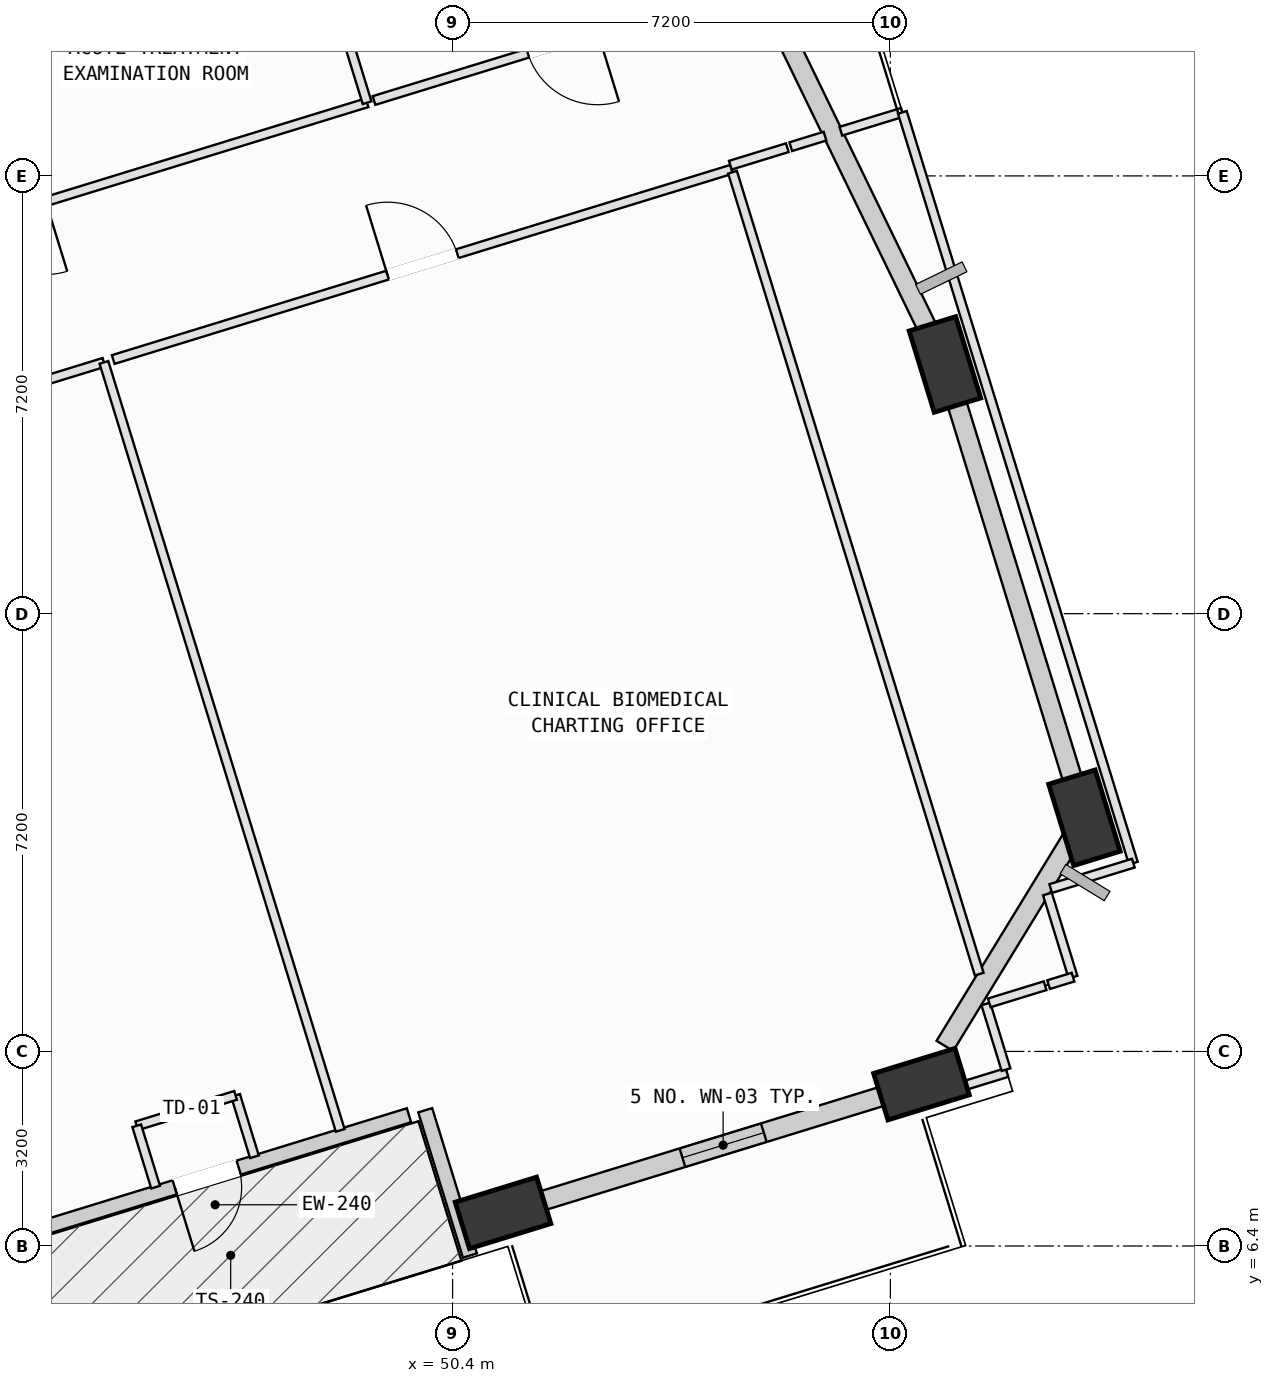
"""IFC4 building model, lengths in metres.
Left out: names, types, materials, properties, quantities, classifications, styles, units other than length and angle.
Written with IfcOpenShell. Run it as: python <this file> out.ifc"""

import sys

from ifc_helpers import new_model, si_unit, direction, frame, frame_2d, origin, origin_2d, place, context, subcontext, project, spatial, rectangle, extrude, element, fill, save


model = new_model("IFC4")
c1 = context("Model", 3, precision=1e-05, world=origin(), true_north=direction((0.0, 1.0)))
c2 = subcontext(c1, "Body", "Model", "MODEL_VIEW")
j1 = project(units=[si_unit("LENGTHUNIT", "METRE"), si_unit("PLANEANGLEUNIT", "RADIAN")], contexts=[c1])
p1 = place(None, origin())
s1 = spatial("IfcSite", under=j1, at=p1, CompositionType="ELEMENT")
p2 = place(p1, origin())
s2 = spatial("IfcBuilding", under=s1, at=p2, CompositionType="ELEMENT")
p3 = place(p2, frame((0.0, 0.0, 96.4)))
s3 = spatial("IfcBuildingStorey", under=s2, at=p3, CompositionType="ELEMENT", Elevation=96.4)
p4 = place(p3, frame((44.348, 4.827, 0.002), z_axis=(0.082049974213, 0.045069704145, 0.995608619639), x_axis=(-0.716749237193, 0.696787516623, 0.027526126896)))
e1 = element("IfcColumn", 1, at=p4, inside=s3, PredefinedType="COLUMN", context=c2, shape_type="SweptSolid", body=[
    extrude(rectangle(XDim=1.4, YDim=0.8, at=origin_2d()), origin(), (0.0, 0.0, 1.0), 4.014),
])
p5 = place(p3, frame((51.23, 6.945, 0.002), z_axis=(0.07303740566, 0.07328045859, 0.994633355445), x_axis=(-0.883427735312, 0.467578794967, 0.030422146198)))
e2 = element("IfcColumn", 2, at=p5, inside=s3, PredefinedType="COLUMN", context=c2, shape_type="SweptSolid", body=[
    extrude(rectangle(XDim=1.4, YDim=0.8, at=origin_2d()), origin(), (0.0, 0.0, 1.0), 4.018),
])
p6 = place(p3, frame((58.111, 9.062, 0.002), z_axis=(0.063925688501, 0.101407733561, 0.992788989627), x_axis=(-0.964220765458, 0.262746812496, 0.035248091899)))
e3 = element("IfcColumn", 3, at=p6, inside=s3, PredefinedType="COLUMN", context=c2, shape_type="SweptSolid", body=[
    extrude(rectangle(XDim=1.4, YDim=0.8, at=origin_2d()), origin(), (0.0, 0.0, 1.0), 4.025),
])
p7 = place(p3, frame((60.792, 13.444, 0.002), z_axis=(0.045783616594, 0.112245661345, 0.992625192085), x_axis=(-0.086057230979, -0.989529923829, 0.115864933618)))
e4 = element("IfcColumn", 4, at=p7, inside=s3, PredefinedType="COLUMN", context=c2, shape_type="SweptSolid", body=[
    extrude(rectangle(XDim=1.4, YDim=0.8, at=origin_2d()), origin(), (0.0, 0.0, 1.0), 4.026),
])
p8 = place(p3, frame((58.498, 20.899, 0.002), z_axis=(0.015250821808, 0.102806336649, 0.994584470811), x_axis=(0.151364494888, -0.983473931417, 0.099336880918)))
e5 = element("IfcColumn", 5, at=p8, inside=s3, PredefinedType="COLUMN", context=c2, shape_type="SweptSolid", body=[
    extrude(rectangle(XDim=1.4, YDim=0.8, at=origin_2d()), origin(), (0.0, 0.0, 1.0), 4.018),
])
p9 = place(p3, frame((49.683, 8.551, 0.0), z_axis=(0.0, 0.0, 1.0), x_axis=(-0.955788867777, -0.294053804998, 0.0)))
e6 = element("IfcWall", 6, at=p9, inside=s3, PredefinedType="SOLIDWALL", context=c2, shape_type="SweptSolid", body=[
    extrude(rectangle(XDim=6.96, YDim=0.24, at=frame_2d((3.48, 0.0))), origin(), (0.0, 0.0, 1.0), 3.165),
])
p10 = place(p9, frame((2.93, 0.0, 0.0)))
e7 = element("IfcOpeningElement", 7, at=p10, cuts=e6, PredefinedType="OPENING", context=c2, shape_type="SweptSolid", body=[
    extrude(rectangle(XDim=1.1, YDim=2.15, at=frame_2d((0.55, 1.075))), frame((0.0, 0.13, 0.0), z_axis=(0.0, -1.0, 0.0), x_axis=(1.0, 0.0, 0.0)), (0.0, 0.0, 1.0), 0.26),
])
p11 = place(p3, frame((50.686, 6.243, 0.0), z_axis=(0.0, 0.0, 1.0), x_axis=(-0.29411329549, 0.955770563167, 0.0)))
e8 = element("IfcWall", 8, at=p11, inside=s3, PredefinedType="SOLIDWALL", context=c2, shape_type="SweptSolid", body=[
    extrude(rectangle(XDim=2.5, YDim=0.24, at=frame_2d((1.25, 0.0))), origin(), (0.0, 0.0, 1.0), 3.165),
])
p12 = place(p3, frame((57.837, 8.977, 0.0), z_axis=(0.0, 0.0, 1.0), x_axis=(-0.955797610258, -0.294025387042, 0.0)))
e9 = element("IfcWall", 9, at=p12, inside=s3, PredefinedType="SOLIDWALL", context=c2, shape_type="SweptSolid", body=[
    extrude(rectangle(XDim=6.242, YDim=0.32, at=frame_2d((3.121, 0.0))), origin(), (0.0, 0.0, 1.0), 3.165),
])
p13 = place(p12, frame((2.425, 0.0, 0.75)))
e10 = element("IfcOpeningElement", 10, at=p13, cuts=e9, PredefinedType="OPENING", context=c2, shape_type="SweptSolid", body=[
    extrude(rectangle(XDim=1.4, YDim=1.85, at=frame_2d((0.7, 0.925))), frame((0.0, 0.17, 0.0), z_axis=(0.0, -1.0, 0.0), x_axis=(1.0, 0.0, 0.0)), (0.0, 0.0, 1.0), 0.34),
])
p14 = place(p3, frame((60.659, 13.227, 0.0), z_axis=(0.0, 0.0, 1.0), x_axis=(-0.521821602539, -0.85305463783, 0.0)))
e11 = element("IfcWall", 11, at=p14, inside=s3, PredefinedType="SOLIDWALL", context=c2, shape_type="SweptSolid", body=[
    extrude(rectangle(XDim=4.145, YDim=0.32, at=frame_2d((2.073, 0.0))), origin(), (0.0, 0.0, 1.0), 3.165),
])
p15 = place(p3, frame((58.586, 20.612, 0.0), z_axis=(0.0, 0.0, 1.0), x_axis=(0.294040701416, -0.955792899069, 0.0)))
e12 = element("IfcWall", 12, at=p15, inside=s3, PredefinedType="SOLIDWALL", context=c2, shape_type="SweptSolid", body=[
    extrude(rectangle(XDim=6.84, YDim=0.32, at=frame_2d((3.42, 0.0))), origin(), (0.0, 0.0, 1.0), 3.165),
])
p16 = place(p3, frame((54.353, 29.438, 0.0), z_axis=(0.0, 0.0, 1.0), x_axis=(0.436640831381, -0.899635917675, 0.0)))
e13 = element("IfcWall", 13, at=p16, inside=s3, PredefinedType="SOLIDWALL", context=c2, shape_type="SweptSolid", body=[
    extrude(rectangle(XDim=8.838, YDim=0.32, at=frame_2d((4.419, 0.0))), origin(), (0.0, 0.0, 1.0), 3.165),
])
p17 = place(p3, frame((41.742, 25.892, 0.0), z_axis=(0.0, 0.0, 1.0), x_axis=(0.955782399792, 0.294074827635, 0.0)))
e14 = element("IfcWall", 14, at=p17, inside=s3, PredefinedType="SOLIDWALL", context=c2, shape_type="SweptSolid", body=[
    extrude(rectangle(XDim=6.227, YDim=0.32, at=frame_2d((3.113, 0.0))), origin(), (0.0, 0.0, 1.0), 3.145),
])
p18 = place(p17, frame((2.41, 0.0, 0.75)))
e15 = element("IfcOpeningElement", 15, at=p18, cuts=e14, PredefinedType="OPENING", context=c2, shape_type="SweptSolid", body=[
    extrude(rectangle(XDim=1.4, YDim=1.85, at=frame_2d((0.7, 0.925))), frame((0.0, 0.17, 0.0), z_axis=(0.0, -1.0, 0.0), x_axis=(1.0, 0.0, 0.0)), (0.0, 0.0, 1.0), 0.34),
])
p19 = place(p3, frame((38.03, 18.891, 0.0), z_axis=(0.0, 0.0, 1.0), x_axis=(0.955772926222, 0.294105616236, 0.0)))
e16 = element("IfcWall", 16, at=p19, inside=s3, PredefinedType="PARTITIONING", context=c2, shape_type="SweptSolid", body=[
    extrude(rectangle(XDim=6.943, YDim=0.15, at=frame_2d((3.472, 0.0))), origin(), (0.0, 0.0, 1.0), 2.945),
])
p20 = place(p19, frame((2.872, 0.0, 0.0)))
e17 = element("IfcOpeningElement", 17, at=p20, cuts=e16, PredefinedType="OPENING", context=c2, shape_type="SweptSolid", body=[
    extrude(rectangle(XDim=1.2, YDim=2.15, at=frame_2d((0.6, 1.075))), frame((0.0, 0.085, 0.0), z_axis=(0.0, -1.0, 0.0), x_axis=(1.0, 0.0, 0.0)), (0.0, 0.0, 1.0), 0.17),
])
p21 = place(p3, frame((44.666, 20.933, 0.0), z_axis=(0.0, 0.0, 1.0), x_axis=(0.294050797953, -0.955789792906, 0.0)))
e18 = element("IfcWall", 18, at=p21, inside=s3, PredefinedType="PARTITIONING", context=c2, shape_type="SweptSolid", body=[
    extrude(rectangle(XDim=13.215, YDim=0.15, at=frame_2d((6.608, 0.0))), origin(), (0.0, 0.0, 1.0), 3.78),
])
p22 = place(p3, frame((47.141, 7.868, 0.0), z_axis=(0.0, 0.0, 1.0), x_axis=(-0.293728278621, 0.955888957117, 0.0)))
e19 = element("IfcWall", 19, at=p22, inside=s3, PredefinedType="PARTITIONING", context=c2, shape_type="SweptSolid", body=[
    extrude(rectangle(XDim=1.056, YDim=0.15, at=frame_2d((0.528, 0.0))), origin(), (0.0, 0.0, 1.0), 3.78),
])
p23 = place(p3, frame((46.831, 8.877, 0.0), z_axis=(0.0, 0.0, 1.0), x_axis=(-0.955779008722, -0.294085848838, 0.0)))
e20 = element("IfcWall", 20, at=p23, inside=s3, PredefinedType="PARTITIONING", context=c2, shape_type="SweptSolid", body=[
    extrude(rectangle(XDim=1.7, YDim=0.15, at=frame_2d((0.85, 0.0))), origin(), (0.0, 0.0, 1.0), 3.78),
])
p24 = place(p3, frame((45.206, 8.377, 0.0), z_axis=(0.0, 0.0, 1.0), x_axis=(0.293728278621, -0.955888957117, 0.0)))
e21 = element("IfcWall", 21, at=p24, inside=s3, PredefinedType="PARTITIONING", context=c2, shape_type="SweptSolid", body=[
    extrude(rectangle(XDim=1.056, YDim=0.15, at=frame_2d((0.528, 0.0))), origin(), (0.0, 0.0, 1.0), 3.78),
])
p25 = place(p3, frame((59.517, 9.253, 0.0), z_axis=(0.0, 0.0, 1.0), x_axis=(-0.95585717677, -0.293831682461, 0.0)))
e22 = element("IfcWall", 22, at=p25, inside=s3, PredefinedType="PARTITIONING", context=c2, shape_type="SweptSolid", body=[
    extrude(rectangle(XDim=1.688, YDim=0.15, at=frame_2d((0.844, 0.0))), origin(), (0.0, 0.0, 1.0), 3.78),
])
p26 = place(p3, frame((51.938, 6.922, 0.0), z_axis=(0.0, 0.0, 1.0), x_axis=(-0.955710034856, -0.294309920449, 0.0)))
e23 = element("IfcWall", 23, at=p26, inside=s3, PredefinedType="PARTITIONING", context=c2, shape_type="SweptSolid", body=[
    extrude(rectangle(XDim=1.302, YDim=0.15, at=frame_2d((0.651, 0.0))), origin(), (0.0, 0.0, 1.0), 3.165),
])
p27 = place(p3, frame((44.819, 20.98, 0.0), z_axis=(0.0, 0.0, 1.0), x_axis=(0.955786946021, 0.294060051378, 0.0)))
e24 = element("IfcWall", 24, at=p27, inside=s3, PredefinedType="PARTITIONING", context=c2, shape_type="SweptSolid", body=[
    extrude(rectangle(XDim=10.64, YDim=0.15, at=frame_2d((5.32, 0.0))), origin(), (0.0, 0.0, 1.0), 3.78),
])
p28 = place(p27, frame((4.72, 0.0, 0.0)))
e25 = element("IfcOpeningElement", 25, at=p28, cuts=e24, PredefinedType="OPENING", context=c2, shape_type="SweptSolid", body=[
    extrude(rectangle(XDim=1.2, YDim=2.15, at=frame_2d((0.6, 1.075))), frame((0.0, 0.085, 0.0), z_axis=(0.0, -1.0, 0.0), x_axis=(1.0, 0.0, 0.0)), (0.0, 0.0, 1.0), 0.17),
])
p29 = place(p3, frame((55.004, 24.061, 0.0), z_axis=(0.0, 0.0, 1.0), x_axis=(0.294018711163, -0.955799663887, 0.0)))
e26 = element("IfcWall", 26, at=p29, inside=s3, PredefinedType="PARTITIONING", context=c2, shape_type="SweptSolid", body=[
    extrude(rectangle(XDim=13.799, YDim=0.15, at=frame_2d((6.899, 0.0))), origin(), (0.0, 0.0, 1.0), 3.78),
])
p30 = place(p3, frame((59.17, 10.381, 0.0), z_axis=(0.0, 0.0, 1.0), x_axis=(0.293842916737, -0.955853723267, 0.0)))
e27 = element("IfcWall", 27, at=p30, inside=s3, PredefinedType="PARTITIONING", context=c2, shape_type="SweptSolid", body=[
    extrude(rectangle(XDim=1.13, YDim=0.15, at=frame_2d((0.565, 0.0))), origin(), (0.0, 0.0, 1.0), 3.78),
])
p31 = place(p3, frame((48.994, 25.204, 0.0), z_axis=(0.0, 0.0, 1.0), x_axis=(-0.955791928213, -0.294043857208, 0.0)))
e28 = element("IfcWall", 28, at=p31, inside=s3, PredefinedType="PARTITIONING", context=c2, shape_type="SweptSolid", body=[
    extrude(rectangle(XDim=12.257, YDim=0.15, at=frame_2d((6.128, 0.0))), origin(), (0.0, 0.0, 1.0), 2.945),
])
p32 = place(p31, frame((5.528, 0.0, 0.0)))
e29 = element("IfcOpeningElement", 29, at=p32, cuts=e28, PredefinedType="OPENING", context=c2, shape_type="SweptSolid", body=[
    extrude(rectangle(XDim=1.2, YDim=2.15, at=frame_2d((0.6, 1.075))), frame((0.0, 0.085, 0.0), z_axis=(0.0, -1.0, 0.0), x_axis=(1.0, 0.0, 0.0)), (0.0, 0.0, 1.0), 0.17),
])
p33 = place(p3, frame((36.297, 24.793, 0.0), z_axis=(0.0, 0.0, 1.0), x_axis=(0.955791928213, 0.294043857208, 0.0)))
e30 = element("IfcWall", 30, at=p33, inside=s3, PredefinedType="PARTITIONING", context=c2, shape_type="SweptSolid", body=[
    extrude(rectangle(XDim=12.257, YDim=0.15, at=frame_2d((6.128, 0.0))), origin(), (0.0, 0.0, 1.0), 3.145),
])
p34 = place(p3, frame((48.012, 28.397, 0.0), z_axis=(0.0, 0.0, 1.0), x_axis=(0.293952315678, -0.955820085637, 0.0)))
e31 = element("IfcWall", 31, at=p34, inside=s3, PredefinedType="PARTITIONING", context=c2, shape_type="SweptSolid", body=[
    extrude(rectangle(XDim=3.34, YDim=0.15, at=frame_2d((1.67, 0.0))), origin(), (0.0, 0.0, 1.0), 3.78),
])
p35 = place(p3, frame((55.314, 27.149, 0.0), z_axis=(0.0, 0.0, 1.0), x_axis=(-0.955805833241, -0.293998655001, 0.0)))
e32 = element("IfcWall", 32, at=p35, inside=s3, PredefinedType="PARTITIONING", context=c2, shape_type="SweptSolid", body=[
    extrude(rectangle(XDim=6.493, YDim=0.15, at=frame_2d((3.247, 0.0))), origin(), (0.0, 0.0, 1.0), 3.78),
])
p36 = place(p35, frame((2.646, 0.0, 0.0)))
e33 = element("IfcOpeningElement", 33, at=p36, cuts=e32, PredefinedType="OPENING", context=c2, shape_type="SweptSolid", body=[
    extrude(rectangle(XDim=1.2, YDim=2.15, at=frame_2d((0.6, 1.075))), frame((0.0, 0.085, 0.0), z_axis=(0.0, -1.0, 0.0), x_axis=(1.0, 0.0, 0.0)), (0.0, 0.0, 1.0), 0.17),
])
p37 = place(p3, frame((54.968, 24.176, 0.0), z_axis=(0.0, 0.0, 1.0), x_axis=(0.955843603332, 0.293875834271, 0.0)))
e34 = element("IfcWall", 34, at=p37, inside=s3, PredefinedType="PARTITIONING", context=c2, shape_type="SweptSolid", body=[
    extrude(rectangle(XDim=0.98, YDim=0.15, at=frame_2d((0.49, 0.0))), origin(), (0.0, 0.0, 1.0), 3.78),
])
p38 = place(p3, frame((60.145, 10.681, 0.0), z_axis=(0.0, 0.0, 1.0), x_axis=(-0.955916327649, -0.293639191073, 0.0)))
e35 = element("IfcWall", 35, at=p38, inside=s3, PredefinedType="PARTITIONING", context=c2, shape_type="SweptSolid", body=[
    extrude(rectangle(XDim=0.96, YDim=0.15, at=frame_2d((0.48, 0.0))), origin(), (0.0, 0.0, 1.0), 3.78),
])
p39 = place(p3, frame((60.183, 12.19, 0.0), z_axis=(0.0, 0.0, 1.0), x_axis=(0.294085848838, -0.955779008722, 0.0)))
e36 = element("IfcWall", 36, at=p39, inside=s3, PredefinedType="PARTITIONING", context=c2, shape_type="SweptSolid", body=[
    extrude(rectangle(XDim=1.431, YDim=0.15, at=frame_2d((0.716, 0.0))), origin(), (0.0, 0.0, 1.0), 3.78),
])
p40 = place(p3, frame((60.604, 10.822, 0.0), z_axis=(0.0, 0.0, 1.0), x_axis=(-0.95622979802, -0.292616768793, 0.0)))
e37 = element("IfcWall", 37, at=p40, inside=s3, PredefinedType="PARTITIONING", context=c2, shape_type="SweptSolid", body=[
    extrude(rectangle(XDim=0.42, YDim=0.15, at=frame_2d((0.21, 0.0))), origin(), (0.0, 0.0, 1.0), 3.78),
])
p41 = place(p3, frame((55.962, 24.481, 0.0), z_axis=(0.0, 0.0, 1.0), x_axis=(0.95584172242, 0.29388195195, 0.0)))
e38 = element("IfcWall", 38, at=p41, inside=s3, PredefinedType="PARTITIONING", context=c2, shape_type="SweptSolid", body=[
    extrude(rectangle(XDim=0.589, YDim=0.15, at=frame_2d((0.294, 0.0))), origin(), (0.0, 0.0, 1.0), 3.78),
])
p42 = place(p3, frame((56.786, 24.735, 0.0), z_axis=(0.0, 0.0, 1.0), x_axis=(0.955873764291, 0.293777716548, 0.0)))
e39 = element("IfcWall", 39, at=p42, inside=s3, PredefinedType="PARTITIONING", context=c2, shape_type="SweptSolid", body=[
    extrude(rectangle(XDim=1.058, YDim=0.15, at=frame_2d((0.529, 0.0))), origin(), (0.0, 0.0, 1.0), 3.78),
])
p43 = place(p3, frame((57.797, 25.046, 0.0), z_axis=(0.0, 0.0, 1.0), x_axis=(0.294027422774, -0.955796984018, 0.0)))
e40 = element("IfcWall", 40, at=p43, inside=s3, PredefinedType="PARTITIONING", context=c2, shape_type="SweptSolid", body=[
    extrude(rectangle(XDim=12.92, YDim=0.15, at=frame_2d((6.46, 0.0))), origin(), (0.0, 0.0, 1.0), 3.165),
])
p44 = place(p3, frame((61.596, 12.697, 0.0), z_axis=(0.0, 0.0, 1.0), x_axis=(-0.955808707238, -0.293989311317, 0.0)))
e41 = element("IfcWall", 41, at=p44, inside=s3, PredefinedType="PARTITIONING", context=c2, shape_type="SweptSolid", body=[
    extrude(rectangle(XDim=1.422, YDim=0.15, at=frame_2d((0.711, 0.0))), origin(), (0.0, 0.0, 1.0), 3.78),
])
p45 = place(p10, origin())
e42 = element("IfcDoor", 42, at=p45, inside=s3, OperationType="SINGLE_SWING_RIGHT", PredefinedType="DOOR", context=c2, shape_type="SweptSolid", body=[
    extrude(rectangle(XDim=1.1, YDim=2.15, at=frame_2d((0.55, 1.075))), frame((0.0, 0.025, 0.0), z_axis=(0.0, -1.0, 0.0), x_axis=(1.0, 0.0, 0.0)), (0.0, 0.0, 1.0), 0.05),
])
fill(e7, e42)
p46 = place(p13, origin())
e43 = element("IfcWindow", 43, at=p46, inside=s3, PartitioningType="SINGLE_PANEL", PredefinedType="WINDOW", context=c2, shape_type="SweptSolid", body=[
    extrude(rectangle(XDim=1.4, YDim=1.85, at=frame_2d((0.7, 0.925))), frame((0.0, 0.03, 0.0), z_axis=(0.0, -1.0, 0.0), x_axis=(1.0, 0.0, 0.0)), (0.0, 0.0, 1.0), 0.06),
])
fill(e10, e43)
p47 = place(p28, origin())
e44 = element("IfcDoor", 44, at=p47, inside=s3, OperationType="SINGLE_SWING_LEFT", PredefinedType="DOOR", context=c2, shape_type="SweptSolid", body=[
    extrude(rectangle(XDim=1.2, YDim=2.15, at=frame_2d((0.6, 1.075))), frame((0.0, 0.025, 0.0), z_axis=(0.0, -1.0, 0.0), x_axis=(1.0, 0.0, 0.0)), (0.0, 0.0, 1.0), 0.05),
])
fill(e25, e44)
p48 = place(p36, origin())
e45 = element("IfcDoor", 45, at=p48, inside=s3, OperationType="SINGLE_SWING_LEFT", PredefinedType="DOOR", context=c2, shape_type="SweptSolid", body=[
    extrude(rectangle(XDim=1.2, YDim=2.15, at=frame_2d((0.6, 1.075))), frame((0.0, 0.025, 0.0), z_axis=(0.0, -1.0, 0.0), x_axis=(1.0, 0.0, 0.0)), (0.0, 0.0, 1.0), 0.05),
])
fill(e33, e45)
save(model, sys.argv[1])
